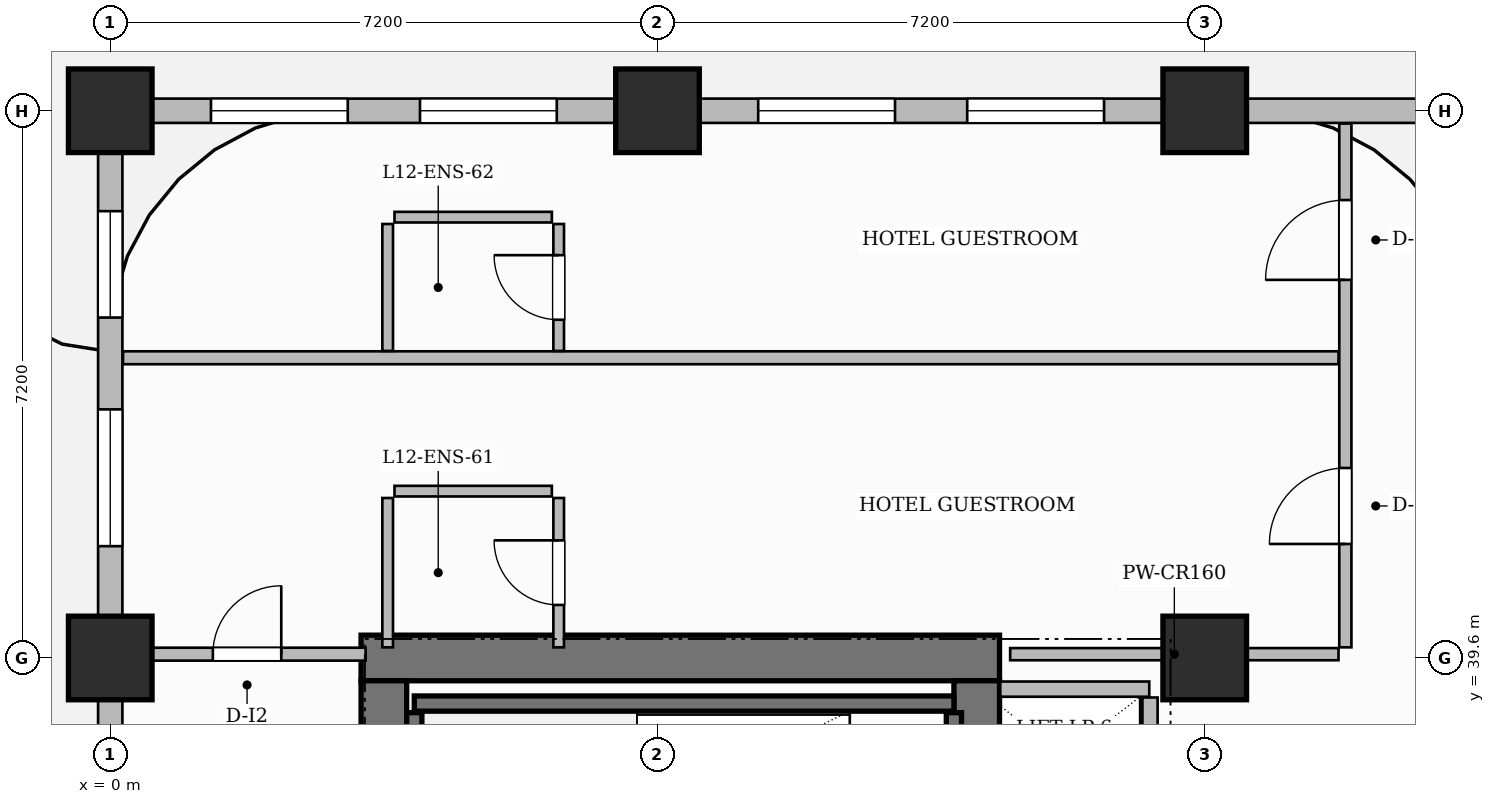
"""IFC4 building model, lengths in metres.
Left out: names, types, materials, properties, quantities, classifications, styles, units other than length and angle.
Written with IfcOpenShell. Run it as: python <this file> out.ifc"""

import sys

from ifc_helpers import new_model, si_unit, direction, frame, frame_2d, origin, origin_2d, place, context, subcontext, project, spatial, rectangle, extrude, source, transform, mapped, element, fill, save


model = new_model("IFC4")
c1 = context("Model", 3, precision=1e-05, world=origin(), true_north=direction((0.0, 1.0)))
c2 = subcontext(c1, "Body", "Model", "MODEL_VIEW")
j1 = project(units=[si_unit("LENGTHUNIT", "METRE"), si_unit("PLANEANGLEUNIT", "RADIAN")], contexts=[c1])
p1 = place(None, origin())
s1 = spatial("IfcSite", under=j1, at=p1, CompositionType="ELEMENT")
p2 = place(p1, origin())
s2 = spatial("IfcBuilding", under=s1, at=p2, CompositionType="ELEMENT")
p3 = place(p2, frame((0.0, 0.0, 54.6)))
s3 = spatial("IfcBuildingStorey", under=s2, at=p3, CompositionType="ELEMENT", Elevation=54.6)
p4 = place(p3, frame((3.3, 39.6, 0.0), z_axis=(0.0, 0.0, 1.0), x_axis=(1.0, 0.0, 0.0)))
e1 = element("IfcWall", 1, at=p4, inside=s3, PredefinedType="SHEAR", context=c2, shape_type="SweptSolid", body=[
    extrude(rectangle(XDim=8.4, YDim=0.6, at=frame_2d((4.2, 0.0))), origin(), (0.0, 0.0, 1.0), 3.7),
])
p5 = place(p3, frame((3.6, 25.5, 0.0), z_axis=(0.0, 0.0, 1.0), x_axis=(0.0, 1.0, 0.0)))
e2 = element("IfcWall", 2, at=p5, inside=s3, PredefinedType="SHEAR", context=c2, shape_type="SweptSolid", body=[
    extrude(rectangle(XDim=13.8, YDim=0.6, at=frame_2d((6.9, 0.0))), origin(), (0.0, 0.0, 1.0), 3.7),
])
p6 = place(p3, frame((11.4, 25.5, 0.0), z_axis=(0.0, 0.0, 1.0), x_axis=(0.0, 1.0, 0.0)))
e3 = element("IfcWall", 3, at=p6, inside=s3, PredefinedType="SHEAR", context=c2, shape_type="SweptSolid", body=[
    extrude(rectangle(XDim=13.8, YDim=0.6, at=frame_2d((6.9, 0.0))), origin(), (0.0, 0.0, 1.0), 3.7),
])
p7 = place(p6, frame((6.47, 0.0, 0.0)))
e4 = element("IfcOpeningElement", 4, at=p7, cuts=e3, PredefinedType="OPENING", context=c2, shape_type="SweptSolid", body=[
    extrude(rectangle(XDim=1.5, YDim=2.2, at=frame_2d((0.75, 1.1))), frame((0.0, 0.31, 0.0), z_axis=(0.0, -1.0, 0.0), x_axis=(1.0, 0.0, 0.0)), (0.0, 0.0, 1.0), 0.62),
])
m1 = source(origin(), c2, "Body", "SweptSolid", [
    extrude(rectangle(XDim=1.1, YDim=1.1, at=origin_2d()), origin(), (0.0, 0.0, 1.0), 3.7),
])
for number, where, z_axis, x_axis in (
    (5, (0.0, 39.6, 0.0), (0.0, 0.0, 1.0), (1.0, 0.0, 0.0)),
    (6, (0.0, 46.8, 0.0), (0.0, 0.0, 1.0), (1.0, 0.0, 0.0)),
    (7, (7.2, 46.8, 0.0), (0.0, 0.0, 1.0), (1.0, 0.0, 0.0)),
    (8, (14.4, 39.6, 0.0), (0.0, 0.0, 1.0), (1.0, 0.0, 0.0)),
    (9, (14.4, 46.8, 0.0), (0.0, 0.0, 1.0), (1.0, 0.0, 0.0)),
):
    element("IfcColumn", number, at=place(p3, frame(where, z_axis=z_axis, x_axis=x_axis)), inside=s3, PredefinedType="COLUMN", context=c2, shape_type="MappedRepresentation", body=[
        mapped(m1, transform((0.0, 0.0, 0.0), scale=1.0)),
    ])
p8 = place(p3, frame((4.0, 39.0, 0.0), z_axis=(0.0, 0.0, 1.0), x_axis=(1.0, 0.0, 0.0)))
e10 = element("IfcWall", 10, at=p8, inside=s3, PredefinedType="SHEAR", context=c2, shape_type="SweptSolid", body=[
    extrude(rectangle(XDim=7.1, YDim=0.2, at=frame_2d((3.55, 0.0))), origin(), (0.0, 0.0, 1.0), 3.7),
])
for number, where, z_axis, x_axis in (
    (11, (4.0, 36.18, 0.0), (0.0, 0.0, 1.0), (0.0, 1.0, 0.0)),
    (12, (11.1, 36.18, 0.0), (0.0, 0.0, 1.0), (0.0, 1.0, 0.0)),
):
    element("IfcWall", number, at=place(p3, frame(where, z_axis=z_axis, x_axis=x_axis)), inside=s3, PredefinedType="SHEAR", context=c2, shape_type="SweptSolid", body=[
        extrude(rectangle(XDim=2.7, YDim=0.2, at=frame_2d((1.35, 0.0))), origin(), (0.0, 0.0, 1.0), 3.7),
    ])
p9 = place(p3, frame((11.71, 39.19, 0.0), z_axis=(0.0, 0.0, 1.0), x_axis=(1.0, 0.0, 0.0)))
e13 = element("IfcWall", 13, at=p9, inside=s3, PredefinedType="PARTITIONING", context=c2, shape_type="SweptSolid", body=[
    extrude(rectangle(XDim=1.96, YDim=0.2, at=frame_2d((0.98, 0.0))), origin(), (0.0, 0.0, 1.0), 3.45),
])
p10 = place(p3, frame((13.68, 34.36, 0.0), z_axis=(0.0, 0.0, 1.0), x_axis=(0.0, 1.0, 0.0)))
e14 = element("IfcWall", 14, at=p10, inside=s3, PredefinedType="PARTITIONING", context=c2, shape_type="SweptSolid", body=[
    extrude(rectangle(XDim=4.72, YDim=0.2, at=frame_2d((2.36, 0.0))), origin(), (0.0, 0.0, 1.0), 3.45),
])
p11 = place(p3, frame((16.25, 39.74, 0.0), z_axis=(0.0, 0.0, 1.0), x_axis=(0.0, 1.0, 0.0)))
e15 = element("IfcWall", 15, at=p11, inside=s3, PredefinedType="PARTITIONING", context=c2, shape_type="SweptSolid", body=[
    extrude(rectangle(XDim=6.892, YDim=0.16, at=frame_2d((3.446, 0.0))), origin(), (0.0, 0.0, 1.0), 3.45),
])
p12 = place(p11, frame((1.36, 0.0, 0.0)))
e16 = element("IfcOpeningElement", 16, at=p12, cuts=e15, PredefinedType="OPENING", context=c2, shape_type="SweptSolid", body=[
    extrude(rectangle(XDim=1.0, YDim=2.2, at=frame_2d((0.5, 1.1))), frame((0.0, 0.09, 0.0), z_axis=(0.0, -1.0, 0.0), x_axis=(1.0, 0.0, 0.0)), (0.0, 0.0, 1.0), 0.18),
])
p13 = place(p11, frame((4.835, 0.0, 0.0)))
e17 = element("IfcOpeningElement", 17, at=p13, cuts=e15, PredefinedType="OPENING", context=c2, shape_type="SweptSolid", body=[
    extrude(rectangle(XDim=1.05, YDim=2.25, at=frame_2d((0.525, 1.125))), frame((0.0, 0.09, 0.0), z_axis=(0.0, -1.0, 0.0), x_axis=(1.0, 0.0, 0.0)), (0.0, 0.0, 1.0), 0.18),
])
p14 = place(p3, frame((11.84, 39.65, 0.0), z_axis=(0.0, 0.0, 1.0), x_axis=(1.0, 0.0, 0.0)))
e18 = element("IfcWall", 18, at=p14, inside=s3, PredefinedType="PARTITIONING", context=c2, shape_type="SweptSolid", body=[
    extrude(rectangle(XDim=4.32, YDim=0.16, at=frame_2d((2.16, 0.0))), origin(), (0.0, 0.0, 1.0), 2.885),
])
p15 = place(p3, frame((0.24, 39.65, 0.0), z_axis=(0.0, 0.0, 1.0), x_axis=(1.0, 0.0, 0.0)))
e19 = element("IfcWall", 19, at=p15, inside=s3, PredefinedType="PARTITIONING", context=c2, shape_type="SweptSolid", body=[
    extrude(rectangle(XDim=3.12, YDim=0.17, at=frame_2d((1.56, 0.0))), origin(), (0.0, 0.0, 1.0), 3.45),
])
p16 = place(p15, frame((1.11, 0.0, 0.0)))
e20 = element("IfcOpeningElement", 20, at=p16, cuts=e19, PredefinedType="OPENING", context=c2, shape_type="SweptSolid", body=[
    extrude(rectangle(XDim=0.9, YDim=2.15, at=frame_2d((0.45, 1.075))), frame((0.0, 0.095, 0.0), z_axis=(0.0, -1.0, 0.0), x_axis=(1.0, 0.0, 0.0)), (0.0, 0.0, 1.0), 0.19),
])
p17 = place(p3, frame((0.168, 43.55, 0.0), z_axis=(0.0, 0.0, 1.0), x_axis=(1.0, 0.0, 0.0)))
e21 = element("IfcWall", 21, at=p17, inside=s3, PredefinedType="PARTITIONING", context=c2, shape_type="SweptSolid", body=[
    extrude(rectangle(XDim=15.992, YDim=0.17, at=frame_2d((7.996, 0.0))), origin(), (0.0, 0.0, 1.0), 3.45),
])
p18 = place(p3, frame((3.65, 39.74, 0.0), z_axis=(0.0, 0.0, 1.0), x_axis=(0.0, 1.0, 0.0)))
e22 = element("IfcWall", 22, at=p18, inside=s3, PredefinedType="PARTITIONING", context=c2, shape_type="SweptSolid", body=[
    extrude(rectangle(XDim=1.965, YDim=0.14, at=frame_2d((0.982, 0.0))), origin(), (0.0, 0.0, 1.0), 3.45),
])
p19 = place(p3, frame((3.74, 41.795, 0.0), z_axis=(0.0, 0.0, 1.0), x_axis=(1.0, 0.0, 0.0)))
e23 = element("IfcWall", 23, at=p19, inside=s3, PredefinedType="PARTITIONING", context=c2, shape_type="SweptSolid", body=[
    extrude(rectangle(XDim=2.07, YDim=0.14, at=frame_2d((1.035, 0.0))), origin(), (0.0, 0.0, 1.0), 2.885),
])
p20 = place(p3, frame((5.9, 39.74, 0.0), z_axis=(0.0, 0.0, 1.0), x_axis=(0.0, 1.0, 0.0)))
e24 = element("IfcWall", 24, at=p20, inside=s3, PredefinedType="PARTITIONING", context=c2, shape_type="SweptSolid", body=[
    extrude(rectangle(XDim=1.965, YDim=0.14, at=frame_2d((0.982, 0.0))), origin(), (0.0, 0.0, 1.0), 3.45),
])
p21 = place(p20, frame((0.558, 0.0, 0.0)))
e25 = element("IfcOpeningElement", 25, at=p21, cuts=e24, PredefinedType="OPENING", context=c2, shape_type="SweptSolid", body=[
    extrude(rectangle(XDim=0.85, YDim=2.1, at=frame_2d((0.425, 1.05))), frame((0.0, 0.08, 0.0), z_axis=(0.0, -1.0, 0.0), x_axis=(1.0, 0.0, 0.0)), (0.0, 0.0, 1.0), 0.16),
])
p22 = place(p3, frame((3.65, 43.64, 0.0), z_axis=(0.0, 0.0, 1.0), x_axis=(0.0, 1.0, 0.0)))
e26 = element("IfcWall", 26, at=p22, inside=s3, PredefinedType="PARTITIONING", context=c2, shape_type="SweptSolid", body=[
    extrude(rectangle(XDim=1.67, YDim=0.14, at=frame_2d((0.835, 0.0))), origin(), (0.0, 0.0, 1.0), 3.45),
])
p23 = place(p3, frame((3.74, 45.4, 0.0), z_axis=(0.0, 0.0, 1.0), x_axis=(1.0, 0.0, 0.0)))
e27 = element("IfcWall", 27, at=p23, inside=s3, PredefinedType="PARTITIONING", context=c2, shape_type="SweptSolid", body=[
    extrude(rectangle(XDim=2.07, YDim=0.14, at=frame_2d((1.035, 0.0))), origin(), (0.0, 0.0, 1.0), 3.45),
])
p24 = place(p3, frame((5.9, 43.64, 0.0), z_axis=(0.0, 0.0, 1.0), x_axis=(0.0, 1.0, 0.0)))
e28 = element("IfcWall", 28, at=p24, inside=s3, PredefinedType="PARTITIONING", context=c2, shape_type="SweptSolid", body=[
    extrude(rectangle(XDim=1.67, YDim=0.14, at=frame_2d((0.835, 0.0))), origin(), (0.0, 0.0, 1.0), 3.45),
])
p25 = place(p24, frame((0.41, 0.0, 0.0)))
e29 = element("IfcOpeningElement", 29, at=p25, cuts=e28, PredefinedType="OPENING", context=c2, shape_type="SweptSolid", body=[
    extrude(rectangle(XDim=0.85, YDim=2.1, at=frame_2d((0.425, 1.05))), frame((0.0, 0.08, 0.0), z_axis=(0.0, -1.0, 0.0), x_axis=(1.0, 0.0, 0.0)), (0.0, 0.0, 1.0), 0.16),
])
p26 = place(p3, frame((0.0, 46.8, 0.0), z_axis=(0.0, 0.0, 1.0), x_axis=(1.0, 0.0, 0.0)))
e30 = element("IfcWall", 30, at=p26, inside=s3, PredefinedType="SOLIDWALL", context=c2, shape_type="SweptSolid", body=[
    extrude(rectangle(XDim=18.0, YDim=0.32, at=frame_2d((9.0, 0.0))), origin(), (0.0, 0.0, 1.0), 2.885),
])
p27 = place(p26, frame((1.325, 0.0, 0.8)))
e31 = element("IfcOpeningElement", 31, at=p27, cuts=e30, PredefinedType="OPENING", context=c2, shape_type="SweptSolid", body=[
    extrude(rectangle(XDim=1.8, YDim=1.85, at=frame_2d((0.9, 0.925))), frame((0.0, 0.17, 0.0), z_axis=(0.0, -1.0, 0.0), x_axis=(1.0, 0.0, 0.0)), (0.0, 0.0, 1.0), 0.34),
])
p28 = place(p26, frame((4.075, 0.0, 0.8)))
e32 = element("IfcOpeningElement", 32, at=p28, cuts=e30, PredefinedType="OPENING", context=c2, shape_type="SweptSolid", body=[
    extrude(rectangle(XDim=1.8, YDim=1.85, at=frame_2d((0.9, 0.925))), frame((0.0, 0.17, 0.0), z_axis=(0.0, -1.0, 0.0), x_axis=(1.0, 0.0, 0.0)), (0.0, 0.0, 1.0), 0.34),
])
p29 = place(p26, frame((8.525, 0.0, 0.8)))
e33 = element("IfcOpeningElement", 33, at=p29, cuts=e30, PredefinedType="OPENING", context=c2, shape_type="SweptSolid", body=[
    extrude(rectangle(XDim=1.8, YDim=1.85, at=frame_2d((0.9, 0.925))), frame((0.0, 0.17, 0.0), z_axis=(0.0, -1.0, 0.0), x_axis=(1.0, 0.0, 0.0)), (0.0, 0.0, 1.0), 0.34),
])
p30 = place(p26, frame((11.275, 0.0, 0.8)))
e34 = element("IfcOpeningElement", 34, at=p30, cuts=e30, PredefinedType="OPENING", context=c2, shape_type="SweptSolid", body=[
    extrude(rectangle(XDim=1.8, YDim=1.85, at=frame_2d((0.9, 0.925))), frame((0.0, 0.17, 0.0), z_axis=(0.0, -1.0, 0.0), x_axis=(1.0, 0.0, 0.0)), (0.0, 0.0, 1.0), 0.34),
])
p31 = place(p3, frame((0.0, 25.25, 0.0), z_axis=(0.0, 0.0, 1.0), x_axis=(0.0, 1.0, 0.0)))
e35 = element("IfcWall", 35, at=p31, inside=s3, PredefinedType="SOLIDWALL", context=c2, shape_type="SweptSolid", body=[
    extrude(rectangle(XDim=21.5, YDim=0.32, at=frame_2d((10.75, 0.0))), origin(), (0.0, 0.0, 1.0), 2.885),
])
p32 = place(p31, frame((1.275, 0.0, 0.8)))
e36 = element("IfcOpeningElement", 36, at=p32, cuts=e35, PredefinedType="OPENING", context=c2, shape_type="SweptSolid", body=[
    extrude(rectangle(XDim=1.8, YDim=1.85, at=frame_2d((0.9, 0.925))), frame((0.0, 0.17, 0.0), z_axis=(0.0, -1.0, 0.0), x_axis=(1.0, 0.0, 0.0)), (0.0, 0.0, 1.0), 0.34),
])
p33 = place(p31, frame((4.025, 0.0, 0.8)))
e37 = element("IfcOpeningElement", 37, at=p33, cuts=e35, PredefinedType="OPENING", context=c2, shape_type="SweptSolid", body=[
    extrude(rectangle(XDim=1.8, YDim=1.85, at=frame_2d((0.9, 0.925))), frame((0.0, 0.17, 0.0), z_axis=(0.0, -1.0, 0.0), x_axis=(1.0, 0.0, 0.0)), (0.0, 0.0, 1.0), 0.34),
])
p34 = place(p31, frame((8.475, 0.0, 0.8)))
e38 = element("IfcOpeningElement", 38, at=p34, cuts=e35, PredefinedType="OPENING", context=c2, shape_type="SweptSolid", body=[
    extrude(rectangle(XDim=1.8, YDim=1.85, at=frame_2d((0.9, 0.925))), frame((0.0, 0.17, 0.0), z_axis=(0.0, -1.0, 0.0), x_axis=(1.0, 0.0, 0.0)), (0.0, 0.0, 1.0), 0.34),
])
p35 = place(p31, frame((11.225, 0.0, 0.8)))
e39 = element("IfcOpeningElement", 39, at=p35, cuts=e35, PredefinedType="OPENING", context=c2, shape_type="SweptSolid", body=[
    extrude(rectangle(XDim=1.8, YDim=1.85, at=frame_2d((0.9, 0.925))), frame((0.0, 0.17, 0.0), z_axis=(0.0, -1.0, 0.0), x_axis=(1.0, 0.0, 0.0)), (0.0, 0.0, 1.0), 0.34),
])
p36 = place(p31, frame((15.821, 0.0, 0.8)))
e40 = element("IfcOpeningElement", 40, at=p36, cuts=e35, PredefinedType="OPENING", context=c2, shape_type="SweptSolid", body=[
    extrude(rectangle(XDim=1.8, YDim=1.85, at=frame_2d((0.9, 0.925))), frame((0.0, 0.17, 0.0), z_axis=(0.0, -1.0, 0.0), x_axis=(1.0, 0.0, 0.0)), (0.0, 0.0, 1.0), 0.34),
])
p37 = place(p31, frame((18.829, 0.0, 0.8)))
e41 = element("IfcOpeningElement", 41, at=p37, cuts=e35, PredefinedType="OPENING", context=c2, shape_type="SweptSolid", body=[
    extrude(rectangle(XDim=1.4, YDim=1.85, at=frame_2d((0.7, 0.925))), frame((0.0, 0.17, 0.0), z_axis=(0.0, -1.0, 0.0), x_axis=(1.0, 0.0, 0.0)), (0.0, 0.0, 1.0), 0.34),
])
m2 = source(origin(), c2, "Body", "SweptSolid", [
    extrude(rectangle(XDim=0.9, YDim=2.15, at=frame_2d((0.45, 1.075))), frame((0.0, 0.025, 0.0), z_axis=(0.0, -1.0, 0.0), x_axis=(1.0, 0.0, 0.0)), (0.0, 0.0, 1.0), 0.05),
])
p38 = place(p16, origin())
e42 = element("IfcDoor", 42, at=p38, inside=s3, OperationType="SINGLE_SWING_RIGHT", PredefinedType="DOOR", context=c2, shape_type="MappedRepresentation", body=[
    mapped(m2, transform((0.0, 0.0, 0.0), scale=1.0)),
])
fill(e20, e42)
m3 = source(origin(), c2, "Body", "SweptSolid", [
    extrude(rectangle(XDim=0.85, YDim=2.1, at=frame_2d((0.425, 1.05))), frame((0.0, 0.025, 0.0), z_axis=(0.0, -1.0, 0.0), x_axis=(1.0, 0.0, 0.0)), (0.0, 0.0, 1.0), 0.05),
])
p39 = place(p21, origin())
e43 = element("IfcDoor", 43, at=p39, inside=s3, OperationType="SINGLE_SWING_RIGHT", PredefinedType="DOOR", context=c2, shape_type="MappedRepresentation", body=[
    mapped(m3, transform((0.0, 0.0, 0.0), scale=1.0)),
])
fill(e25, e43)
m4 = source(origin(), c2, "Body", "SweptSolid", [
    extrude(rectangle(XDim=1.0, YDim=2.2, at=frame_2d((0.5, 1.1))), frame((0.0, 0.025, 0.0), z_axis=(0.0, -1.0, 0.0), x_axis=(1.0, 0.0, 0.0)), (0.0, 0.0, 1.0), 0.05),
])
p40 = place(p12, origin())
e44 = element("IfcDoor", 44, at=p40, inside=s3, OperationType="SINGLE_SWING_LEFT", PredefinedType="DOOR", context=c2, shape_type="MappedRepresentation", body=[
    mapped(m4, transform((0.0, 0.0, 0.0), scale=1.0)),
])
fill(e16, e44)
p41 = place(p25, origin())
e45 = element("IfcDoor", 45, at=p41, inside=s3, OperationType="SINGLE_SWING_RIGHT", PredefinedType="DOOR", context=c2, shape_type="MappedRepresentation", body=[
    mapped(m3, transform((0.0, 0.0, 0.0), scale=1.0)),
])
fill(e29, e45)
m5 = source(origin(), c2, "Body", "SweptSolid", [
    extrude(rectangle(XDim=1.05, YDim=2.25, at=frame_2d((0.525, 1.125))), frame((0.0, 0.025, 0.0), z_axis=(0.0, -1.0, 0.0), x_axis=(1.0, 0.0, 0.0)), (0.0, 0.0, 1.0), 0.05),
])
p42 = place(p13, origin())
e46 = element("IfcDoor", 46, at=p42, inside=s3, OperationType="SINGLE_SWING_LEFT", PredefinedType="DOOR", context=c2, shape_type="MappedRepresentation", body=[
    mapped(m5, transform((0.0, 0.0, 0.0), scale=1.0)),
])
fill(e17, e46)
m6 = source(origin(), c2, "Body", "SweptSolid", [
    extrude(rectangle(XDim=1.8, YDim=1.85, at=frame_2d((0.9, 0.925))), frame((0.0, 0.03, 0.0), z_axis=(0.0, -1.0, 0.0), x_axis=(1.0, 0.0, 0.0)), (0.0, 0.0, 1.0), 0.06),
])
p43 = place(p27, origin())
e47 = element("IfcWindow", 47, at=p43, inside=s3, PartitioningType="DOUBLE_PANEL_VERTICAL", PredefinedType="WINDOW", context=c2, shape_type="MappedRepresentation", body=[
    mapped(m6, transform((0.0, 0.0, 0.0), scale=1.0)),
])
fill(e31, e47)
p44 = place(p28, origin())
e48 = element("IfcWindow", 48, at=p44, inside=s3, PartitioningType="DOUBLE_PANEL_VERTICAL", PredefinedType="WINDOW", context=c2, shape_type="MappedRepresentation", body=[
    mapped(m6, transform((0.0, 0.0, 0.0), scale=1.0)),
])
fill(e32, e48)
p45 = place(p29, origin())
e49 = element("IfcWindow", 49, at=p45, inside=s3, PartitioningType="DOUBLE_PANEL_VERTICAL", PredefinedType="WINDOW", context=c2, shape_type="MappedRepresentation", body=[
    mapped(m6, transform((0.0, 0.0, 0.0), scale=1.0)),
])
fill(e33, e49)
p46 = place(p30, origin())
e50 = element("IfcWindow", 50, at=p46, inside=s3, PartitioningType="DOUBLE_PANEL_VERTICAL", PredefinedType="WINDOW", context=c2, shape_type="MappedRepresentation", body=[
    mapped(m6, transform((0.0, 0.0, 0.0), scale=1.0)),
])
fill(e34, e50)
p47 = place(p36, origin())
e51 = element("IfcWindow", 51, at=p47, inside=s3, PartitioningType="DOUBLE_PANEL_VERTICAL", PredefinedType="WINDOW", context=c2, shape_type="MappedRepresentation", body=[
    mapped(m6, transform((0.0, 0.0, 0.0), scale=1.0)),
])
fill(e40, e51)
m7 = source(origin(), c2, "Body", "SweptSolid", [
    extrude(rectangle(XDim=1.4, YDim=1.85, at=frame_2d((0.7, 0.925))), frame((0.0, 0.03, 0.0), z_axis=(0.0, -1.0, 0.0), x_axis=(1.0, 0.0, 0.0)), (0.0, 0.0, 1.0), 0.06),
])
p48 = place(p37, origin())
e52 = element("IfcWindow", 52, at=p48, inside=s3, PartitioningType="SINGLE_PANEL", PredefinedType="WINDOW", context=c2, shape_type="MappedRepresentation", body=[
    mapped(m7, transform((0.0, 0.0, 0.0), scale=1.0)),
])
fill(e41, e52)
save(model, sys.argv[1])
